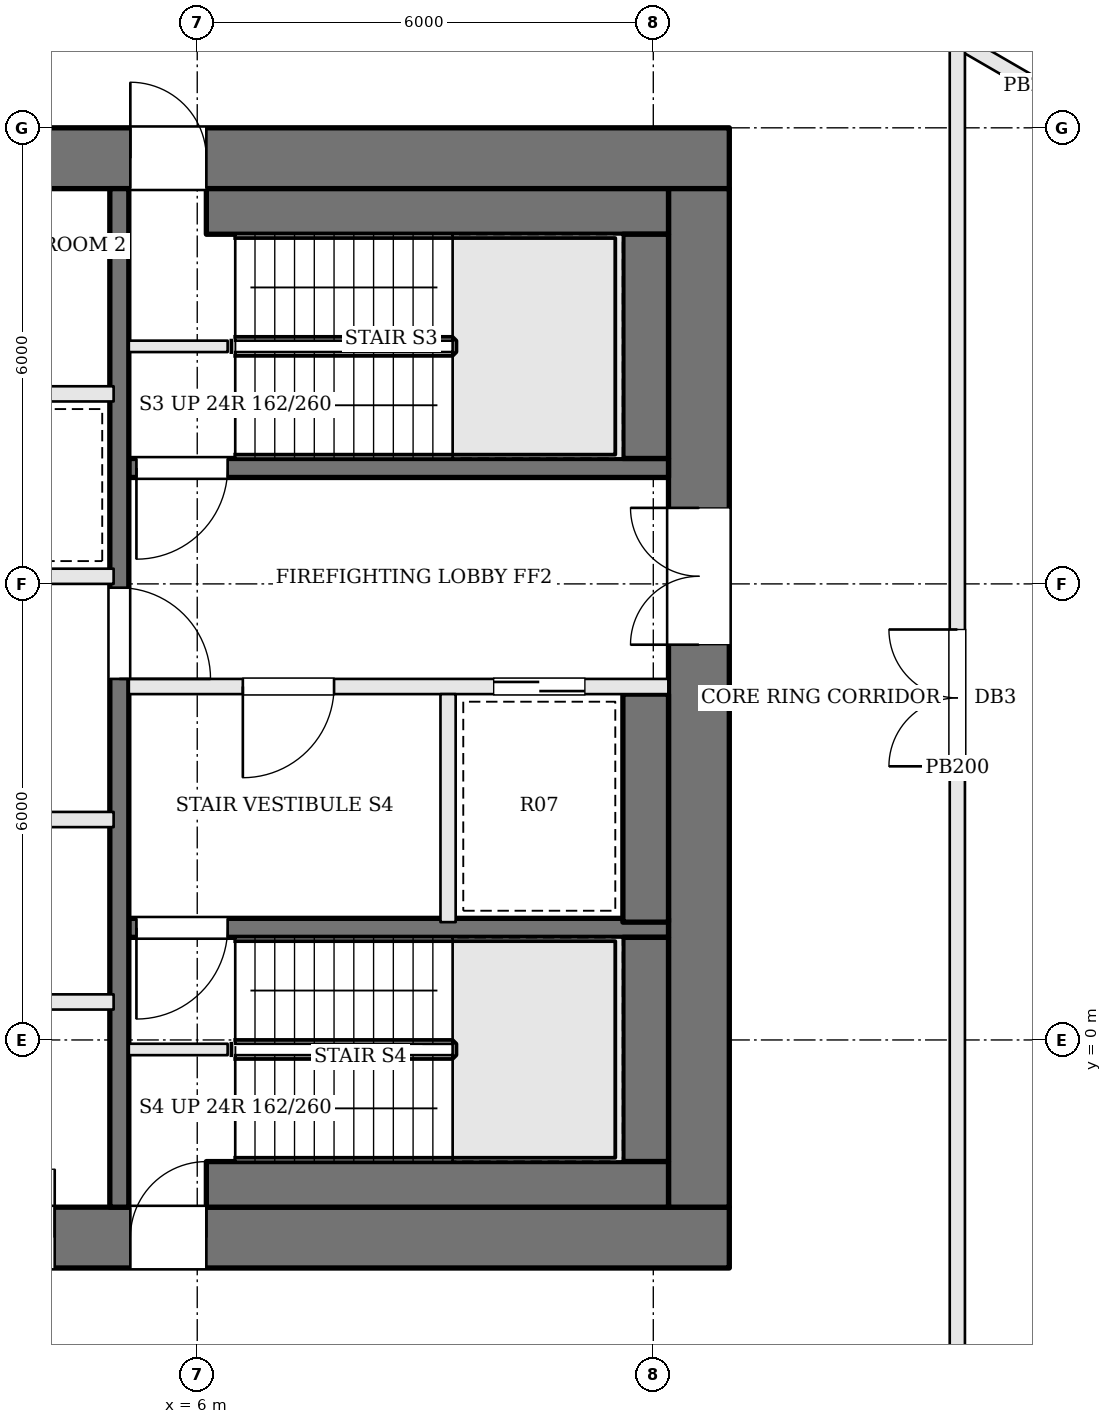
"""IFC4 building model, lengths in metres.
Left out: names, types, materials, properties, quantities, classifications, styles, units other than length and angle.
Written with IfcOpenShell. Run it as: python <this file> out.ifc"""

import sys

from ifc_helpers import new_model, si_unit, direction, frame, frame_2d, origin, place, context, subcontext, project, spatial, rectangle, extrude, element, fill, save


model = new_model("IFC4")
c1 = context("Model", 3, precision=1e-05, world=origin(), true_north=direction((0.0, 1.0)))
c2 = subcontext(c1, "Body", "Model", "MODEL_VIEW")
j1 = project(units=[si_unit("LENGTHUNIT", "METRE"), si_unit("PLANEANGLEUNIT", "RADIAN")], contexts=[c1])
p1 = place(None, origin())
s1 = spatial("IfcSite", under=j1, at=p1, CompositionType="ELEMENT")
p2 = place(p1, origin())
s2 = spatial("IfcBuilding", under=s1, at=p2, CompositionType="ELEMENT")
p3 = place(p2, frame((0.0, 0.0, 193.5)))
s3 = spatial("IfcBuildingStorey", under=s2, at=p3, CompositionType="ELEMENT", Elevation=193.5)
p4 = place(p3, frame((-13.0, 11.6, 0.0), z_axis=(0.0, 0.0, 1.0), x_axis=(1.0, 0.0, 0.0)))
e1 = element("IfcWall", 1, at=p4, inside=s3, PredefinedType="SHEAR", context=c2, shape_type="SweptSolid", body=[
    extrude(rectangle(XDim=26.0, YDim=0.8, at=frame_2d((13.0, 0.0))), origin(), (0.0, 0.0, 1.0), 3.9),
])
p5 = place(p4, frame((8.575, 0.0, 0.0)))
e2 = element("IfcOpeningElement", 2, at=p5, cuts=e1, PredefinedType="OPENING", context=c2, shape_type="SweptSolid", body=[
    extrude(rectangle(XDim=0.7, YDim=2.1, at=frame_2d((0.35, 1.05))), frame((0.0, 0.41, 0.0), z_axis=(0.0, -1.0, 0.0), x_axis=(1.0, 0.0, 0.0)), (0.0, 0.0, 1.0), 0.82),
])
p6 = place(p4, frame((10.875, 0.0, 0.0)))
e3 = element("IfcOpeningElement", 3, at=p6, cuts=e1, PredefinedType="OPENING", context=c2, shape_type="SweptSolid", body=[
    extrude(rectangle(XDim=1.0, YDim=2.1, at=frame_2d((0.5, 1.05))), frame((0.0, 0.41, 0.0), z_axis=(0.0, -1.0, 0.0), x_axis=(1.0, 0.0, 0.0)), (0.0, 0.0, 1.0), 0.82),
])
p7 = place(p4, frame((13.875, 0.0, 0.0)))
e4 = element("IfcOpeningElement", 4, at=p7, cuts=e1, PredefinedType="OPENING", context=c2, shape_type="SweptSolid", body=[
    extrude(rectangle(XDim=0.7, YDim=2.1, at=frame_2d((0.35, 1.05))), frame((0.0, 0.41, 0.0), z_axis=(0.0, -1.0, 0.0), x_axis=(1.0, 0.0, 0.0)), (0.0, 0.0, 1.0), 0.82),
])
p8 = place(p4, frame((16.325, 0.0, 0.0)))
e5 = element("IfcOpeningElement", 5, at=p8, cuts=e1, PredefinedType="OPENING", context=c2, shape_type="SweptSolid", body=[
    extrude(rectangle(XDim=0.7, YDim=2.1, at=frame_2d((0.35, 1.05))), frame((0.0, 0.41, 0.0), z_axis=(0.0, -1.0, 0.0), x_axis=(1.0, 0.0, 0.0)), (0.0, 0.0, 1.0), 0.82),
])
p9 = place(p4, frame((6.88, 0.0, 0.0)))
e6 = element("IfcOpeningElement", 6, at=p9, cuts=e1, PredefinedType="OPENING", context=c2, shape_type="SweptSolid", body=[
    extrude(rectangle(XDim=1.0, YDim=2.1, at=frame_2d((0.5, 1.05))), frame((0.0, 0.41, 0.0), z_axis=(0.0, -1.0, 0.0), x_axis=(1.0, 0.0, 0.0)), (0.0, 0.0, 1.0), 0.82),
])
p10 = place(p4, frame((18.12, 0.0, 0.0)))
e7 = element("IfcOpeningElement", 7, at=p10, cuts=e1, PredefinedType="OPENING", context=c2, shape_type="SweptSolid", body=[
    extrude(rectangle(XDim=1.0, YDim=2.1, at=frame_2d((0.5, 1.05))), frame((0.0, 0.41, 0.0), z_axis=(0.0, -1.0, 0.0), x_axis=(1.0, 0.0, 0.0)), (0.0, 0.0, 1.0), 0.82),
])
p11 = place(p3, frame((-13.0, -2.6, 0.0), z_axis=(0.0, 0.0, 1.0), x_axis=(1.0, 0.0, 0.0)))
e8 = element("IfcWall", 8, at=p11, inside=s3, PredefinedType="SHEAR", context=c2, shape_type="SweptSolid", body=[
    extrude(rectangle(XDim=26.0, YDim=0.8, at=frame_2d((13.0, 0.0))), origin(), (0.0, 0.0, 1.0), 3.9),
])
p12 = place(p11, frame((8.975, 0.0, 0.0)))
e9 = element("IfcOpeningElement", 9, at=p12, cuts=e8, PredefinedType="OPENING", context=c2, shape_type="SweptSolid", body=[
    extrude(rectangle(XDim=0.7, YDim=2.1, at=frame_2d((0.35, 1.05))), frame((0.0, 0.41, 0.0), z_axis=(0.0, -1.0, 0.0), x_axis=(1.0, 0.0, 0.0)), (0.0, 0.0, 1.0), 0.82),
])
p13 = place(p11, frame((11.675, 0.0, 0.0)))
e10 = element("IfcOpeningElement", 10, at=p13, cuts=e8, PredefinedType="OPENING", context=c2, shape_type="SweptSolid", body=[
    extrude(rectangle(XDim=1.0, YDim=2.1, at=frame_2d((0.5, 1.05))), frame((0.0, 0.41, 0.0), z_axis=(0.0, -1.0, 0.0), x_axis=(1.0, 0.0, 0.0)), (0.0, 0.0, 1.0), 0.82),
])
p14 = place(p11, frame((14.275, 0.0, 0.0)))
e11 = element("IfcOpeningElement", 11, at=p14, cuts=e8, PredefinedType="OPENING", context=c2, shape_type="SweptSolid", body=[
    extrude(rectangle(XDim=0.7, YDim=2.1, at=frame_2d((0.35, 1.05))), frame((0.0, 0.41, 0.0), z_axis=(0.0, -1.0, 0.0), x_axis=(1.0, 0.0, 0.0)), (0.0, 0.0, 1.0), 0.82),
])
p15 = place(p11, frame((16.225, 0.0, 0.0)))
e12 = element("IfcOpeningElement", 12, at=p15, cuts=e8, PredefinedType="OPENING", context=c2, shape_type="SweptSolid", body=[
    extrude(rectangle(XDim=0.9, YDim=2.1, at=frame_2d((0.45, 1.05))), frame((0.0, 0.41, 0.0), z_axis=(0.0, -1.0, 0.0), x_axis=(1.0, 0.0, 0.0)), (0.0, 0.0, 1.0), 0.82),
])
p16 = place(p11, frame((6.88, 0.0, 0.0)))
e13 = element("IfcOpeningElement", 13, at=p16, cuts=e8, PredefinedType="OPENING", context=c2, shape_type="SweptSolid", body=[
    extrude(rectangle(XDim=1.0, YDim=2.1, at=frame_2d((0.5, 1.05))), frame((0.0, 0.41, 0.0), z_axis=(0.0, -1.0, 0.0), x_axis=(1.0, 0.0, 0.0)), (0.0, 0.0, 1.0), 0.82),
])
p17 = place(p11, frame((18.12, 0.0, 0.0)))
e14 = element("IfcOpeningElement", 14, at=p17, cuts=e8, PredefinedType="OPENING", context=c2, shape_type="SweptSolid", body=[
    extrude(rectangle(XDim=1.0, YDim=2.1, at=frame_2d((0.5, 1.05))), frame((0.0, 0.41, 0.0), z_axis=(0.0, -1.0, 0.0), x_axis=(1.0, 0.0, 0.0)), (0.0, 0.0, 1.0), 0.82),
])
p18 = place(p3, frame((12.6, -2.2, 0.0), z_axis=(0.0, 0.0, 1.0), x_axis=(0.0, 1.0, 0.0)))
e15 = element("IfcWall", 15, at=p18, inside=s3, PredefinedType="SHEAR", context=c2, shape_type="SweptSolid", body=[
    extrude(rectangle(XDim=13.4, YDim=0.8, at=frame_2d((6.7, 0.0))), origin(), (0.0, 0.0, 1.0), 3.9),
])
p19 = place(p18, frame((7.4, 0.0, 0.0)))
e16 = element("IfcOpeningElement", 16, at=p19, cuts=e15, PredefinedType="OPENING", context=c2, shape_type="SweptSolid", body=[
    extrude(rectangle(XDim=1.8, YDim=2.1, at=frame_2d((0.9, 1.05))), frame((0.0, 0.41, 0.0), z_axis=(0.0, -1.0, 0.0), x_axis=(1.0, 0.0, 0.0)), (0.0, 0.0, 1.0), 0.82),
])
for number, where, z_axis, x_axis in (
    (17, (6.4, 9.125, 0.0), (0.0, 0.0, 1.0), (-1.0, 0.0, 0.0)),
    (18, (6.4, -0.125, 0.0), (0.0, 0.0, 1.0), (-1.0, 0.0, 0.0)),
):
    element("IfcWall", number, at=place(p3, frame(where, z_axis=z_axis, x_axis=x_axis)), inside=s3, PredefinedType="SOLIDWALL", context=c2, shape_type="SweptSolid", body=[
        extrude(rectangle(XDim=1.3, YDim=0.15, at=frame_2d((0.65, 0.0))), origin(), (0.0, 0.0, 1.0), 3.7),
    ])
p20 = place(p3, frame((12.2, 7.525, 0.0), z_axis=(0.0, 0.0, 1.0), x_axis=(-1.0, 0.0, 0.0)))
e19 = element("IfcWall", 19, at=p20, inside=s3, PredefinedType="SOLIDWALL", context=c2, shape_type="SweptSolid", body=[
    extrude(rectangle(XDim=7.1, YDim=0.25, at=frame_2d((3.55, 0.0))), origin(), (0.0, 0.0, 1.0), 3.7),
])
p21 = place(p20, frame((5.8, 0.0, 0.0)))
e20 = element("IfcOpeningElement", 20, at=p21, cuts=e19, PredefinedType="OPENING", context=c2, shape_type="SweptSolid", body=[
    extrude(rectangle(XDim=1.2, YDim=2.1, at=frame_2d((0.6, 1.05))), frame((0.0, 0.135, 0.0), z_axis=(0.0, -1.0, 0.0), x_axis=(1.0, 0.0, 0.0)), (0.0, 0.0, 1.0), 0.27),
])
p22 = place(p3, frame((12.2, 4.65, 0.0), z_axis=(0.0, 0.0, 1.0), x_axis=(-1.0, 0.0, 0.0)))
e21 = element("IfcWall", 21, at=p22, inside=s3, PredefinedType="SOLIDWALL", context=c2, shape_type="SweptSolid", body=[
    extrude(rectangle(XDim=7.1, YDim=0.2, at=frame_2d((3.55, 0.0))), origin(), (0.0, 0.0, 1.0), 3.7),
])
p23 = place(p22, frame((4.4, 0.0, 0.0)))
e22 = element("IfcOpeningElement", 22, at=p23, cuts=e21, PredefinedType="OPENING", context=c2, shape_type="SweptSolid", body=[
    extrude(rectangle(XDim=1.2, YDim=2.1, at=frame_2d((0.6, 1.05))), frame((0.0, 0.11, 0.0), z_axis=(0.0, -1.0, 0.0), x_axis=(1.0, 0.0, 0.0)), (0.0, 0.0, 1.0), 0.22),
])
p24 = place(p22, frame((1.1, 0.0, 0.0)))
e23 = element("IfcOpeningElement", 23, at=p24, cuts=e21, PredefinedType="OPENING", context=c2, shape_type="SweptSolid", body=[
    extrude(rectangle(XDim=1.2, YDim=2.1, at=frame_2d((0.6, 1.05))), frame((0.0, 0.11, 0.0), z_axis=(0.0, -1.0, 0.0), x_axis=(1.0, 0.0, 0.0)), (0.0, 0.0, 1.0), 0.22),
])
p25 = place(p3, frame((12.2, 1.475, 0.0), z_axis=(0.0, 0.0, 1.0), x_axis=(-1.0, 0.0, 0.0)))
e24 = element("IfcWall", 24, at=p25, inside=s3, PredefinedType="SOLIDWALL", context=c2, shape_type="SweptSolid", body=[
    extrude(rectangle(XDim=7.1, YDim=0.25, at=frame_2d((3.55, 0.0))), origin(), (0.0, 0.0, 1.0), 3.7),
])
p26 = place(p25, frame((5.8, 0.0, 0.0)))
e25 = element("IfcOpeningElement", 25, at=p26, cuts=e24, PredefinedType="OPENING", context=c2, shape_type="SweptSolid", body=[
    extrude(rectangle(XDim=1.2, YDim=2.1, at=frame_2d((0.6, 1.05))), frame((0.0, 0.135, 0.0), z_axis=(0.0, -1.0, 0.0), x_axis=(1.0, 0.0, 0.0)), (0.0, 0.0, 1.0), 0.27),
])
p27 = place(p3, frame((9.3, 4.55, 0.0), z_axis=(0.0, 0.0, 1.0), x_axis=(0.0, -1.0, 0.0)))
e26 = element("IfcWall", 26, at=p27, inside=s3, PredefinedType="SOLIDWALL", context=c2, shape_type="SweptSolid", body=[
    extrude(rectangle(XDim=3.0, YDim=0.2, at=frame_2d((1.5, 0.0))), origin(), (0.0, 0.0, 1.0), 3.7),
])
p28 = place(p3, frame((4.975, 11.2, 0.0), z_axis=(0.0, 0.0, 1.0), x_axis=(0.0, -1.0, 0.0)))
e27 = element("IfcWall", 27, at=p28, inside=s3, PredefinedType="SOLIDWALL", context=c2, shape_type="SweptSolid", body=[
    extrude(rectangle(XDim=13.4, YDim=0.25, at=frame_2d((6.7, 0.0))), origin(), (0.0, 0.0, 1.0), 3.7),
])
p29 = place(p28, frame((5.25, 0.0, 0.0)))
e28 = element("IfcOpeningElement", 28, at=p29, cuts=e27, PredefinedType="OPENING", context=c2, shape_type="SweptSolid", body=[
    extrude(rectangle(XDim=1.2, YDim=2.1, at=frame_2d((0.6, 1.05))), frame((0.0, 0.135, 0.0), z_axis=(0.0, -1.0, 0.0), x_axis=(1.0, 0.0, 0.0)), (0.0, 0.0, 1.0), 0.27),
])
p30 = place(p3, frame((12.2, 10.9, 0.0), z_axis=(0.0, 0.0, 1.0), x_axis=(-1.0, 0.0, 0.0)))
e29 = element("IfcWall", 29, at=p30, inside=s3, PredefinedType="SOLIDWALL", context=c2, shape_type="SweptSolid", body=[
    extrude(rectangle(XDim=6.08, YDim=0.6, at=frame_2d((3.04, 0.0))), origin(), (0.0, 0.0, 1.0), 3.7),
])
p31 = place(p3, frame((11.9, 10.6, 0.0), z_axis=(0.0, 0.0, 1.0), x_axis=(0.0, -1.0, 0.0)))
e30 = element("IfcWall", 30, at=p31, inside=s3, PredefinedType="SOLIDWALL", context=c2, shape_type="SweptSolid", body=[
    extrude(rectangle(XDim=2.95, YDim=0.6, at=frame_2d((1.475, 0.0))), origin(), (0.0, 0.0, 1.0), 3.7),
])
p32 = place(p3, frame((11.9, 4.55, 0.0), z_axis=(0.0, 0.0, 1.0), x_axis=(0.0, -1.0, 0.0)))
e31 = element("IfcWall", 31, at=p32, inside=s3, PredefinedType="SOLIDWALL", context=c2, shape_type="SweptSolid", body=[
    extrude(rectangle(XDim=3.0, YDim=0.6, at=frame_2d((1.5, 0.0))), origin(), (0.0, 0.0, 1.0), 3.7),
])
p33 = place(p3, frame((11.9, 1.35, 0.0), z_axis=(0.0, 0.0, 1.0), x_axis=(0.0, -1.0, 0.0)))
e32 = element("IfcWall", 32, at=p33, inside=s3, PredefinedType="SOLIDWALL", context=c2, shape_type="SweptSolid", body=[
    extrude(rectangle(XDim=2.95, YDim=0.6, at=frame_2d((1.475, 0.0))), origin(), (0.0, 0.0, 1.0), 3.7),
])
p34 = place(p3, frame((12.2, -1.9, 0.0), z_axis=(0.0, 0.0, 1.0), x_axis=(-1.0, 0.0, 0.0)))
e33 = element("IfcWall", 33, at=p34, inside=s3, PredefinedType="SOLIDWALL", context=c2, shape_type="SweptSolid", body=[
    extrude(rectangle(XDim=6.08, YDim=0.6, at=frame_2d((3.04, 0.0))), origin(), (0.0, 0.0, 1.0), 3.7),
])
p35 = place(p3, frame((-4.9, 0.5, 0.0), z_axis=(0.0, 0.0, 1.0), x_axis=(1.0, 0.0, 0.0)))
e34 = element("IfcWall", 34, at=p35, inside=s3, PredefinedType="SOLIDWALL", context=c2, shape_type="SweptSolid", body=[
    extrude(rectangle(XDim=9.8, YDim=0.2, at=frame_2d((4.9, 0.0))), origin(), (0.0, 0.0, 1.0), 3.7),
])
p36 = place(p3, frame((-4.9, 2.9, 0.0), z_axis=(0.0, 0.0, 1.0), x_axis=(1.0, 0.0, 0.0)))
e35 = element("IfcWall", 35, at=p36, inside=s3, PredefinedType="SOLIDWALL", context=c2, shape_type="SweptSolid", body=[
    extrude(rectangle(XDim=9.8, YDim=0.2, at=frame_2d((4.9, 0.0))), origin(), (0.0, 0.0, 1.0), 3.7),
])
p37 = place(p36, frame((2.613, 0.0, 0.0)))
e36 = element("IfcOpeningElement", 36, at=p37, cuts=e35, PredefinedType="OPENING", context=c2, shape_type="SweptSolid", body=[
    extrude(rectangle(XDim=0.9, YDim=2.1, at=frame_2d((0.45, 1.05))), frame((0.0, 0.11, 0.0), z_axis=(0.0, -1.0, 0.0), x_axis=(1.0, 0.0, 0.0)), (0.0, 0.0, 1.0), 0.22),
])
p38 = place(p36, frame((7.463, 0.0, 0.0)))
e37 = element("IfcOpeningElement", 37, at=p38, cuts=e35, PredefinedType="OPENING", context=c2, shape_type="SweptSolid", body=[
    extrude(rectangle(XDim=1.0, YDim=2.1, at=frame_2d((0.5, 1.05))), frame((0.0, 0.11, 0.0), z_axis=(0.0, -1.0, 0.0), x_axis=(1.0, 0.0, 0.0)), (0.0, 0.0, 1.0), 0.22),
])
for number, where, z_axis, x_axis in (
    (38, (-4.9, 6.1, 0.0), (0.0, 0.0, 1.0), (1.0, 0.0, 0.0)),
    (39, (-4.9, 8.5, 0.0), (0.0, 0.0, 1.0), (1.0, 0.0, 0.0)),
):
    element("IfcWall", number, at=place(p3, frame(where, z_axis=z_axis, x_axis=x_axis)), inside=s3, PredefinedType="SOLIDWALL", context=c2, shape_type="SweptSolid", body=[
        extrude(rectangle(XDim=9.8, YDim=0.2, at=frame_2d((4.9, 0.0))), origin(), (0.0, 0.0, 1.0), 3.7),
    ])
p39 = place(p3, frame((15.913, 13.202, 0.0), z_axis=(0.0, 0.0, 1.0), x_axis=(0.86524014554, -0.501357647339, 0.0)))
e40 = element("IfcWall", 40, at=p39, inside=s3, PredefinedType="PARTITIONING", context=c2, shape_type="SweptSolid", body=[
    extrude(rectangle(XDim=2.575, YDim=0.2, at=frame_2d((1.288, 0.0))), origin(), (0.0, 0.0, 1.0), 3.7),
])
p40 = place(p3, frame((16.0, -5.9, 0.0), z_axis=(0.0, 0.0, 1.0), x_axis=(0.0, 1.0, 0.0)))
e41 = element("IfcWall", 41, at=p40, inside=s3, PredefinedType="PARTITIONING", context=c2, shape_type="SweptSolid", body=[
    extrude(rectangle(XDim=18.952, YDim=0.2, at=frame_2d((9.476, 0.0))), origin(), (0.0, 0.0, 1.0), 3.7),
])
p41 = place(p40, frame((9.5, 0.0, 0.0)))
e42 = element("IfcOpeningElement", 42, at=p41, cuts=e41, PredefinedType="OPENING", context=c2, shape_type="SweptSolid", body=[
    extrude(rectangle(XDim=1.8, YDim=2.1, at=frame_2d((0.9, 1.05))), frame((0.0, 0.11, 0.0), z_axis=(0.0, -1.0, 0.0), x_axis=(1.0, 0.0, 0.0)), (0.0, 0.0, 1.0), 0.22),
])
p42 = place(p19, origin())
e43 = element("IfcDoor", 43, at=p42, inside=s3, OperationType="DOUBLE_DOOR_SINGLE_SWING", PredefinedType="DOOR", context=c2, shape_type="SweptSolid", body=[
    extrude(rectangle(XDim=1.8, YDim=2.1, at=frame_2d((0.9, 1.05))), frame((0.0, 0.025, 0.0), z_axis=(0.0, -1.0, 0.0), x_axis=(1.0, 0.0, 0.0)), (0.0, 0.0, 1.0), 0.05),
])
fill(e16, e43)
p43 = place(p29, origin())
e44 = element("IfcDoor", 44, at=p43, inside=s3, OperationType="SINGLE_SWING_RIGHT", PredefinedType="DOOR", context=c2, shape_type="SweptSolid", body=[
    extrude(rectangle(XDim=1.2, YDim=2.1, at=frame_2d((0.6, 1.05))), frame((0.0, 0.025, 0.0), z_axis=(0.0, -1.0, 0.0), x_axis=(1.0, 0.0, 0.0)), (0.0, 0.0, 1.0), 0.05),
])
fill(e28, e44)
p44 = place(p23, origin())
e45 = element("IfcDoor", 45, at=p44, inside=s3, OperationType="SINGLE_SWING_RIGHT", PredefinedType="DOOR", context=c2, shape_type="SweptSolid", body=[
    extrude(rectangle(XDim=1.2, YDim=2.1, at=frame_2d((0.6, 1.05))), frame((0.0, 0.025, 0.0), z_axis=(0.0, -1.0, 0.0), x_axis=(1.0, 0.0, 0.0)), (0.0, 0.0, 1.0), 0.05),
])
fill(e22, e45)
p45 = place(p21, origin())
e46 = element("IfcDoor", 46, at=p45, inside=s3, OperationType="SINGLE_SWING_RIGHT", PredefinedType="DOOR", context=c2, shape_type="SweptSolid", body=[
    extrude(rectangle(XDim=1.2, YDim=2.1, at=frame_2d((0.6, 1.05))), frame((0.0, 0.025, 0.0), z_axis=(0.0, -1.0, 0.0), x_axis=(1.0, 0.0, 0.0)), (0.0, 0.0, 1.0), 0.05),
])
fill(e20, e46)
p46 = place(p26, origin())
e47 = element("IfcDoor", 47, at=p46, inside=s3, OperationType="SINGLE_SWING_RIGHT", PredefinedType="DOOR", context=c2, shape_type="SweptSolid", body=[
    extrude(rectangle(XDim=1.2, YDim=2.1, at=frame_2d((0.6, 1.05))), frame((0.0, 0.025, 0.0), z_axis=(0.0, -1.0, 0.0), x_axis=(1.0, 0.0, 0.0)), (0.0, 0.0, 1.0), 0.05),
])
fill(e25, e47)
p47 = place(p24, origin())
e48 = element("IfcDoor", 48, at=p47, inside=s3, OperationType="SLIDING_TO_RIGHT", PredefinedType="DOOR", context=c2, shape_type="SweptSolid", body=[
    extrude(rectangle(XDim=1.2, YDim=2.1, at=frame_2d((0.6, 1.05))), frame((0.0, 0.025, 0.0), z_axis=(0.0, -1.0, 0.0), x_axis=(1.0, 0.0, 0.0)), (0.0, 0.0, 1.0), 0.05),
])
fill(e23, e48)
p48 = place(p15, origin())
e49 = element("IfcDoor", 49, at=p48, inside=s3, OperationType="SINGLE_SWING_RIGHT", PredefinedType="DOOR", context=c2, shape_type="SweptSolid", body=[
    extrude(rectangle(XDim=0.9, YDim=2.1, at=frame_2d((0.45, 1.05))), frame((0.0, 0.025, 0.0), z_axis=(0.0, -1.0, 0.0), x_axis=(1.0, 0.0, 0.0)), (0.0, 0.0, 1.0), 0.05),
])
fill(e12, e49)
p49 = place(p10, origin())
e50 = element("IfcDoor", 50, at=p49, inside=s3, OperationType="SINGLE_SWING_LEFT", PredefinedType="DOOR", context=c2, shape_type="SweptSolid", body=[
    extrude(rectangle(XDim=1.0, YDim=2.1, at=frame_2d((0.5, 1.05))), frame((0.0, 0.025, 0.0), z_axis=(0.0, -1.0, 0.0), x_axis=(1.0, 0.0, 0.0)), (0.0, 0.0, 1.0), 0.05),
])
fill(e7, e50)
p50 = place(p17, origin())
e51 = element("IfcDoor", 51, at=p50, inside=s3, OperationType="SINGLE_SWING_RIGHT", PredefinedType="DOOR", context=c2, shape_type="SweptSolid", body=[
    extrude(rectangle(XDim=1.0, YDim=2.1, at=frame_2d((0.5, 1.05))), frame((0.0, 0.025, 0.0), z_axis=(0.0, -1.0, 0.0), x_axis=(1.0, 0.0, 0.0)), (0.0, 0.0, 1.0), 0.05),
])
fill(e14, e51)
p51 = place(p41, origin())
e52 = element("IfcDoor", 52, at=p51, inside=s3, OperationType="DOUBLE_DOOR_SINGLE_SWING", PredefinedType="DOOR", context=c2, shape_type="SweptSolid", body=[
    extrude(rectangle(XDim=1.8, YDim=2.1, at=frame_2d((0.9, 1.05))), frame((0.0, 0.025, 0.0), z_axis=(0.0, -1.0, 0.0), x_axis=(1.0, 0.0, 0.0)), (0.0, 0.0, 1.0), 0.05),
])
fill(e42, e52)
save(model, sys.argv[1])
